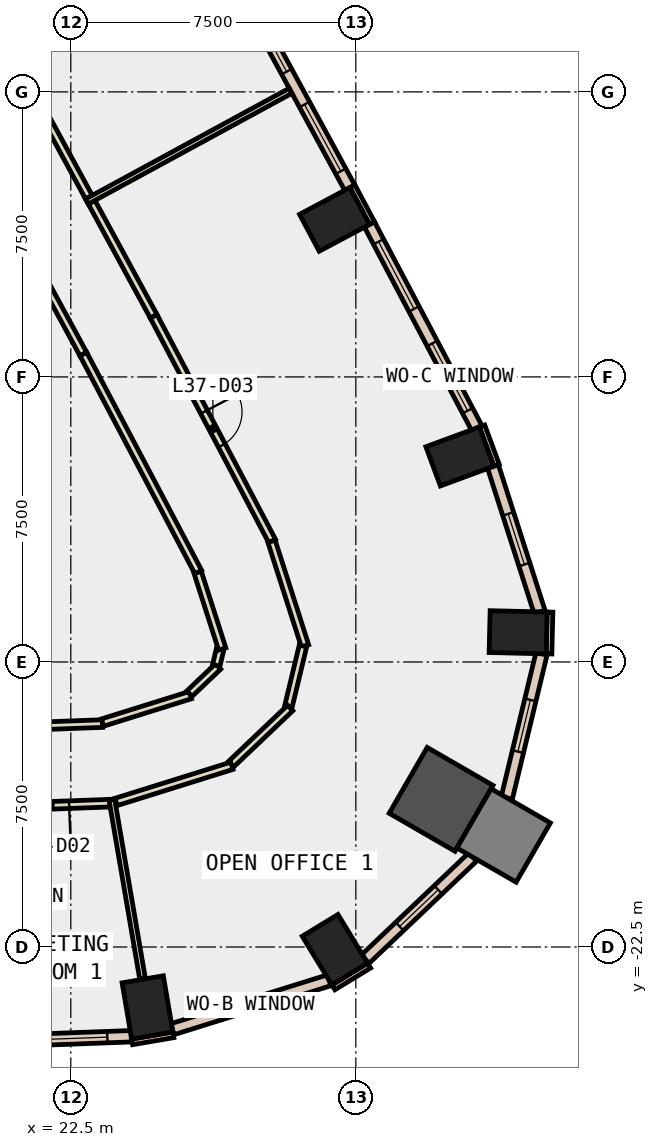
"""IFC4 building model, lengths in metres.
Left out: names, types, materials, properties, quantities, classifications, styles, units other than length and angle.
Written with IfcOpenShell. Run it as: python <this file> out.ifc"""

import sys

from ifc_helpers import new_model, si_unit, direction, frame, frame_2d, origin, origin_2d, place, context, subcontext, project, spatial, rectangle, extrude, element, fill, save


model = new_model("IFC4")
c1 = context("Model", 3, precision=1e-05, world=origin(), true_north=direction((0.0, 1.0)))
c2 = subcontext(c1, "Body", "Model", "MODEL_VIEW")
j1 = project(units=[si_unit("LENGTHUNIT", "METRE"), si_unit("PLANEANGLEUNIT", "RADIAN")], contexts=[c1])
p1 = place(None, origin())
s1 = spatial("IfcSite", under=j1, at=p1, CompositionType="ELEMENT")
p2 = place(p1, origin())
s2 = spatial("IfcBuilding", under=s1, at=p2, CompositionType="ELEMENT")
p3 = place(p2, frame((0.0, 0.0, 167.6)))
s3 = spatial("IfcBuildingStorey", under=s2, at=p3, CompositionType="ELEMENT", Elevation=167.6)
for number, where, z_axis, x_axis in (
    (1, (24.518, -24.09, -0.4), (0.0, 0.0, 1.0), (0.986, 0.168, 0.0)),
    (2, (29.45, -22.571, -0.4), (0.0, 0.0, 1.0), (0.854, 0.521, 0.0)),
):
    element("IfcColumn", number, at=place(p3, frame(where, z_axis=z_axis, x_axis=x_axis)), inside=s3, PredefinedType="COLUMN", context=c2, shape_type="SweptSolid", body=[
        extrude(rectangle(XDim=1.1, YDim=1.5, at=origin_2d()), origin(), (0.0, 0.0, 1.0), 4.2),
    ])
p4 = place(p3, frame((32.244, -18.615, -0.4), z_axis=(0.0, 0.0, 1.0), x_axis=(-0.866025403784, 0.5, 0.0)))
e3 = element("IfcColumn", 3, at=p4, inside=s3, PredefinedType="COLUMN", context=c2, shape_type="SweptSolid", body=[
    extrude(rectangle(XDim=2.0, YDim=2.0, at=origin_2d()), origin(), (0.0, 0.0, 1.0), 4.2),
])
for number, where, z_axis, x_axis in (
    (4, (34.271, -14.219, -0.4), (0.0, 0.0, 1.0), (0.024, 1.0, 0.0)),
    (5, (32.738, -9.593, -0.4), (0.0, 0.0, 1.0), (-0.347, 0.938, 0.0)),
    (6, (29.44, -3.355, -0.4), (0.0, 0.0, 1.0), (-0.47, 0.883, 0.0)),
):
    element("IfcColumn", number, at=place(p3, frame(where, z_axis=z_axis, x_axis=x_axis)), inside=s3, PredefinedType="COLUMN", context=c2, shape_type="SweptSolid", body=[
        extrude(rectangle(XDim=1.1, YDim=1.5, at=origin_2d()), origin(), (0.0, 0.0, 1.0), 4.2),
    ])
p5 = place(p3, frame((33.889, -19.565, -0.4), z_axis=(0.0, 0.0, 1.0), x_axis=(-0.866025403784, 0.5, 0.0)))
e7 = element("IfcColumn", 7, at=p5, inside=s3, PredefinedType="COLUMN", context=c2, shape_type="SweptSolid", body=[
    extrude(rectangle(XDim=1.8, YDim=1.8, at=origin_2d()), origin(), (0.0, 0.0, 1.0), 4.2),
])
for number, where, z_axis, x_axis in (
    (8, (33.702, -9.823, 0.0), (0.0, 0.0, 1.0), (-0.346, 0.938, 0.0)),
    (9, (30.426, -3.453, 0.0), (0.0, 0.0, 1.0), (-0.47, 0.883, 0.0)),
):
    element("IfcWall", number, at=place(p3, frame(where, z_axis=z_axis, x_axis=x_axis)), inside=s3, PredefinedType="STANDARD", context=c2, shape_type="SweptSolid", body=[
        extrude(rectangle(XDim=1.1, YDim=0.15, at=frame_2d((0.55, 0.0))), origin(), (0.0, 0.0, 1.0), 3.8),
    ])
p6 = place(p3, frame((24.114, -24.996, 0.0), z_axis=(0.0, 0.0, 1.0), x_axis=(0.985763338892, 0.168138751323, 0.0)))
e10 = element("IfcWall", 10, at=p6, inside=s3, PredefinedType="STANDARD", context=c2, shape_type="SweptSolid", body=[
    extrude(rectangle(XDim=1.101, YDim=0.15, at=frame_2d((0.55, 0.0))), origin(), (0.0, 0.0, 1.0), 3.8),
])
p7 = place(p3, frame((29.41, -23.561, 0.0), z_axis=(0.0, 0.0, 1.0), x_axis=(0.854065628997, 0.520165263514, 0.0)))
e11 = element("IfcWall", 11, at=p7, inside=s3, PredefinedType="STANDARD", context=c2, shape_type="SweptSolid", body=[
    extrude(rectangle(XDim=1.1, YDim=0.15, at=frame_2d((0.55, 0.0))), origin(), (0.0, 0.0, 1.0), 3.8),
])
p8 = place(p3, frame((35.083, -14.789, 0.0), z_axis=(0.0, 0.0, 1.0), x_axis=(0.023517683673, 0.999723421029, 0.0)))
e12 = element("IfcWall", 12, at=p8, inside=s3, PredefinedType="STANDARD", context=c2, shape_type="SweptSolid", body=[
    extrude(rectangle(XDim=1.1, YDim=0.15, at=frame_2d((0.55, 0.0))), origin(), (0.0, 0.0, 1.0), 3.8),
])
p9 = place(p3, frame((16.778, -25.12, 0.0), z_axis=(0.0, 0.0, 1.0), x_axis=(0.999307730926, 0.037202942236, 0.0)))
e13 = element("IfcWall", 13, at=p9, inside=s3, PredefinedType="STANDARD", context=c2, shape_type="SweptSolid", body=[
    extrude(rectangle(XDim=7.317, YDim=0.3, at=frame_2d((3.659, 0.0))), origin(), (0.0, 0.0, 1.0), 3.8),
])
p10 = place(p9, frame((0.629, 0.0, 0.9)))
e14 = element("IfcOpeningElement", 14, at=p10, cuts=e13, PredefinedType="OPENING", context=c2, shape_type="SweptSolid", body=[
    extrude(rectangle(XDim=2.4, YDim=2.6, at=frame_2d((1.2, 1.3))), frame((0.0, 0.16, 0.0), z_axis=(0.0, -1.0, 0.0), x_axis=(1.0, 0.0, 0.0)), (0.0, 0.0, 1.0), 0.32),
])
p11 = place(p9, frame((4.288, 0.0, 0.9)))
e15 = element("IfcOpeningElement", 15, at=p11, cuts=e13, PredefinedType="OPENING", context=c2, shape_type="SweptSolid", body=[
    extrude(rectangle(XDim=2.4, YDim=2.6, at=frame_2d((1.2, 1.3))), frame((0.0, 0.16, 0.0), z_axis=(0.0, -1.0, 0.0), x_axis=(1.0, 0.0, 0.0)), (0.0, 0.0, 1.0), 0.32),
])
p12 = place(p3, frame((25.172, -24.663, 0.0), z_axis=(0.0, 0.0, 1.0), x_axis=(0.954628614874, 0.29779893832, 0.0)))
e16 = element("IfcWall", 16, at=p12, inside=s3, PredefinedType="STANDARD", context=c2, shape_type="SweptSolid", body=[
    extrude(rectangle(XDim=4.322, YDim=0.3, at=frame_2d((2.161, 0.0))), origin(), (0.0, 0.0, 1.0), 3.8),
])
p13 = place(p12, frame((1.461, 0.0, 0.9)))
e17 = element("IfcOpeningElement", 17, at=p13, cuts=e16, PredefinedType="OPENING", context=c2, shape_type="SweptSolid", body=[
    extrude(rectangle(XDim=1.4, YDim=2.6, at=frame_2d((0.7, 1.3))), frame((0.0, 0.16, 0.0), z_axis=(0.0, -1.0, 0.0), x_axis=(1.0, 0.0, 0.0)), (0.0, 0.0, 1.0), 0.32),
])
p14 = place(p3, frame((30.246, -22.821, 0.0), z_axis=(0.0, 0.0, 1.0), x_axis=(0.724807239831, 0.688951714628, 0.0)))
e18 = element("IfcWall", 18, at=p14, inside=s3, PredefinedType="STANDARD", context=c2, shape_type="SweptSolid", body=[
    extrude(rectangle(XDim=3.902, YDim=0.3, at=frame_2d((1.951, 0.0))), origin(), (0.0, 0.0, 1.0), 3.8),
])
p15 = place(p14, frame((1.251, 0.0, 0.9)))
e19 = element("IfcOpeningElement", 19, at=p15, cuts=e18, PredefinedType="OPENING", context=c2, shape_type="SweptSolid", body=[
    extrude(rectangle(XDim=1.4, YDim=2.6, at=frame_2d((0.7, 1.3))), frame((0.0, 0.16, 0.0), z_axis=(0.0, -1.0, 0.0), x_axis=(1.0, 0.0, 0.0)), (0.0, 0.0, 1.0), 0.32),
])
p16 = place(p3, frame((33.973, -18.575, 0.0), z_axis=(0.0, 0.0, 1.0), x_axis=(0.234102046927, 0.972212030179, 0.0)))
e20 = element("IfcWall", 20, at=p16, inside=s3, PredefinedType="STANDARD", context=c2, shape_type="SweptSolid", body=[
    extrude(rectangle(XDim=3.9, YDim=0.3, at=frame_2d((1.95, 0.0))), origin(), (0.0, 0.0, 1.0), 3.8),
])
p17 = place(p16, frame((1.25, 0.0, 0.9)))
e21 = element("IfcOpeningElement", 21, at=p17, cuts=e20, PredefinedType="OPENING", context=c2, shape_type="SweptSolid", body=[
    extrude(rectangle(XDim=1.4, YDim=2.6, at=frame_2d((0.7, 1.3))), frame((0.0, 0.16, 0.0), z_axis=(0.0, -1.0, 0.0), x_axis=(1.0, 0.0, 0.0)), (0.0, 0.0, 1.0), 0.32),
])
p18 = place(p3, frame((34.835, -13.684, 0.0), z_axis=(0.0, 0.0, 1.0), x_axis=(-0.305018133869, 0.952346543025, 0.0)))
e22 = element("IfcWall", 22, at=p18, inside=s3, PredefinedType="STANDARD", context=c2, shape_type="SweptSolid", body=[
    extrude(rectangle(XDim=4.02, YDim=0.3, at=frame_2d((2.01, 0.0))), origin(), (0.0, 0.0, 1.0), 3.8),
])
p19 = place(p18, frame((1.31, 0.0, 0.9)))
e23 = element("IfcOpeningElement", 23, at=p19, cuts=e22, PredefinedType="OPENING", context=c2, shape_type="SweptSolid", body=[
    extrude(rectangle(XDim=1.4, YDim=2.6, at=frame_2d((0.7, 1.3))), frame((0.0, 0.16, 0.0), z_axis=(0.0, -1.0, 0.0), x_axis=(1.0, 0.0, 0.0)), (0.0, 0.0, 1.0), 0.32),
])
p20 = place(p3, frame((33.182, -8.844, 0.0), z_axis=(0.0, 0.0, 1.0), x_axis=(-0.466399410196, 0.884574242316, 0.0)))
e24 = element("IfcWall", 24, at=p20, inside=s3, PredefinedType="STANDARD", context=c2, shape_type="SweptSolid", body=[
    extrude(rectangle(XDim=6.055, YDim=0.3, at=frame_2d((3.027, 0.0))), origin(), (0.0, 0.0, 1.0), 3.8),
])
p21 = place(p20, frame((0.514, 0.0, 0.9)))
e25 = element("IfcOpeningElement", 25, at=p21, cuts=e24, PredefinedType="OPENING", context=c2, shape_type="SweptSolid", body=[
    extrude(rectangle(XDim=2.0, YDim=2.6, at=frame_2d((1.0, 1.3))), frame((0.0, 0.16, 0.0), z_axis=(0.0, -1.0, 0.0), x_axis=(1.0, 0.0, 0.0)), (0.0, 0.0, 1.0), 0.32),
])
p22 = place(p20, frame((3.541, 0.0, 0.9)))
e26 = element("IfcOpeningElement", 26, at=p22, cuts=e24, PredefinedType="OPENING", context=c2, shape_type="SweptSolid", body=[
    extrude(rectangle(XDim=2.0, YDim=2.6, at=frame_2d((1.0, 1.3))), frame((0.0, 0.16, 0.0), z_axis=(0.0, -1.0, 0.0), x_axis=(1.0, 0.0, 0.0)), (0.0, 0.0, 1.0), 0.32),
])
p23 = place(p3, frame((29.839, -2.52, 0.0), z_axis=(0.0, 0.0, 1.0), x_axis=(-0.477555226268, 0.878601733361, 0.0)))
e27 = element("IfcWall", 27, at=p23, inside=s3, PredefinedType="STANDARD", context=c2, shape_type="SweptSolid", body=[
    extrude(rectangle(XDim=5.964, YDim=0.3, at=frame_2d((2.982, 0.0))), origin(), (0.0, 0.0, 1.0), 3.8),
])
p24 = place(p23, frame((0.491, 0.0, 0.9)))
e28 = element("IfcOpeningElement", 28, at=p24, cuts=e27, PredefinedType="OPENING", context=c2, shape_type="SweptSolid", body=[
    extrude(rectangle(XDim=2.0, YDim=2.6, at=frame_2d((1.0, 1.3))), frame((0.0, 0.16, 0.0), z_axis=(0.0, -1.0, 0.0), x_axis=(1.0, 0.0, 0.0)), (0.0, 0.0, 1.0), 0.32),
])
p25 = place(p23, frame((3.473, 0.0, 0.9)))
e29 = element("IfcOpeningElement", 29, at=p25, cuts=e27, PredefinedType="OPENING", context=c2, shape_type="SweptSolid", body=[
    extrude(rectangle(XDim=2.0, YDim=2.6, at=frame_2d((1.0, 1.3))), frame((0.0, 0.16, 0.0), z_axis=(0.0, -1.0, 0.0), x_axis=(1.0, 0.0, 0.0)), (0.0, 0.0, 1.0), 0.32),
])
p26 = place(p3, frame((15.987, -16.893, 0.0), z_axis=(0.0, 0.0, 1.0), x_axis=(0.999316060953, 0.036978511606, 0.0)))
e30 = element("IfcWall", 30, at=p26, inside=s3, PredefinedType="PARTITIONING", context=c2, shape_type="SweptSolid", body=[
    extrude(rectangle(XDim=7.355, YDim=0.2, at=frame_2d((3.677, 0.0))), origin(), (0.0, 0.0, 1.0), 3.8),
])
p27 = place(p3, frame((23.333, -16.595, 0.0), z_axis=(0.0, 0.0, 1.0), x_axis=(0.95454810771, 0.298056890655, 0.0)))
e31 = element("IfcWall", 31, at=p27, inside=s3, PredefinedType="PARTITIONING", context=c2, shape_type="SweptSolid", body=[
    extrude(rectangle(XDim=2.422, YDim=0.2, at=frame_2d((1.211, 0.0))), origin(), (0.0, 0.0, 1.0), 3.8),
])
p28 = place(p3, frame((25.622, -15.834, 0.0), z_axis=(0.0, 0.0, 1.0), x_axis=(0.725069777966, 0.688675407634, 0.0)))
e32 = element("IfcWall", 32, at=p28, inside=s3, PredefinedType="PARTITIONING", context=c2, shape_type="SweptSolid", body=[
    extrude(rectangle(XDim=1.04, YDim=0.2, at=frame_2d((0.52, 0.0))), origin(), (0.0, 0.0, 1.0), 3.8),
])
p29 = place(p3, frame((26.327, -15.089, 0.0), z_axis=(0.0, 0.0, 1.0), x_axis=(0.233414791565, 0.972377259647, 0.0)))
e33 = element("IfcWall", 33, at=p29, inside=s3, PredefinedType="PARTITIONING", context=c2, shape_type="SweptSolid", body=[
    extrude(rectangle(XDim=0.441, YDim=0.2, at=frame_2d((0.221, 0.0))), origin(), (0.0, 0.0, 1.0), 3.8),
])
p30 = place(p3, frame((26.484, -14.658, 0.0), z_axis=(0.0, 0.0, 1.0), x_axis=(-0.305169069368, 0.952298188122, 0.0)))
e34 = element("IfcWall", 34, at=p30, inside=s3, PredefinedType="PARTITIONING", context=c2, shape_type="SweptSolid", body=[
    extrude(rectangle(XDim=2.117, YDim=0.2, at=frame_2d((1.059, 0.0))), origin(), (0.0, 0.0, 1.0), 3.8),
])
p31 = place(p3, frame((25.854, -12.635, 0.0), z_axis=(0.0, 0.0, 1.0), x_axis=(-0.466483047656, 0.884530138689, 0.0)))
e35 = element("IfcWall", 35, at=p31, inside=s3, PredefinedType="PARTITIONING", context=c2, shape_type="SweptSolid", body=[
    extrude(rectangle(XDim=6.487, YDim=0.2, at=frame_2d((3.244, 0.0))), origin(), (0.0, 0.0, 1.0), 3.8),
])
p32 = place(p3, frame((22.828, -6.897, 0.0), z_axis=(0.0, 0.0, 1.0), x_axis=(-0.477513909405, 0.878624189472, 0.0)))
e36 = element("IfcWall", 36, at=p32, inside=s3, PredefinedType="PARTITIONING", context=c2, shape_type="SweptSolid", body=[
    extrude(rectangle(XDim=6.956, YDim=0.2, at=frame_2d((3.478, 0.0))), origin(), (0.0, 0.0, 1.0), 3.8),
])
p33 = place(p3, frame((23.62, -18.712, 0.0), z_axis=(0.0, 0.0, 1.0), x_axis=(-0.999316841287, -0.03695741767, 0.0)))
e37 = element("IfcWall", 37, at=p33, inside=s3, PredefinedType="PARTITIONING", context=c2, shape_type="SweptSolid", body=[
    extrude(rectangle(XDim=3.329, YDim=0.2, at=frame_2d((1.665, 0.0))), origin(), (0.0, 0.0, 1.0), 3.8),
])
p34 = place(p33, frame((1.165, 0.0, 0.0)))
e38 = element("IfcOpeningElement", 38, at=p34, cuts=e37, PredefinedType="OPENING", context=c2, shape_type="SweptSolid", body=[
    extrude(rectangle(XDim=1.0, YDim=2.1, at=frame_2d((0.5, 1.05))), frame((0.0, 0.11, 0.0), z_axis=(0.0, -1.0, 0.0), x_axis=(1.0, 0.0, 0.0)), (0.0, 0.0, 1.0), 0.22),
])
p35 = place(p3, frame((23.048, -2.903, 0.0), z_axis=(0.0, 0.0, 1.0), x_axis=(0.477470161865, -0.878647963936, 0.0)))
e39 = element("IfcWall", 39, at=p35, inside=s3, PredefinedType="PARTITIONING", context=c2, shape_type="SweptSolid", body=[
    extrude(rectangle(XDim=3.418, YDim=0.2, at=frame_2d((1.709, 0.0))), origin(), (0.0, 0.0, 1.0), 3.8),
])
p36 = place(p3, frame((24.68, -5.906, 0.0), z_axis=(0.0, 0.0, 1.0), x_axis=(0.466450727507, -0.884547182918, 0.0)))
e40 = element("IfcWall", 40, at=p36, inside=s3, PredefinedType="PARTITIONING", context=c2, shape_type="SweptSolid", body=[
    extrude(rectangle(XDim=6.685, YDim=0.2, at=frame_2d((3.342, 0.0))), origin(), (0.0, 0.0, 1.0), 3.8),
])
p37 = place(p36, frame((2.842, 0.0, 0.0)))
e41 = element("IfcOpeningElement", 41, at=p37, cuts=e40, PredefinedType="OPENING", context=c2, shape_type="SweptSolid", body=[
    extrude(rectangle(XDim=1.0, YDim=2.1, at=frame_2d((0.5, 1.05))), frame((0.0, 0.11, 0.0), z_axis=(0.0, -1.0, 0.0), x_axis=(1.0, 0.0, 0.0)), (0.0, 0.0, 1.0), 0.22),
])
p38 = place(p3, frame((27.782, -11.825, 0.0), z_axis=(0.0, 0.0, 1.0), x_axis=(0.304925942137, -0.952376065329, 0.0)))
e42 = element("IfcWall", 42, at=p38, inside=s3, PredefinedType="PARTITIONING", context=c2, shape_type="SweptSolid", body=[
    extrude(rectangle(XDim=2.89, YDim=0.2, at=frame_2d((1.445, 0.0))), origin(), (0.0, 0.0, 1.0), 3.8),
])
p39 = place(p3, frame((28.609, -14.579, 0.0), z_axis=(0.0, 0.0, 1.0), x_axis=(-0.233826017197, -0.972278454807, 0.0)))
e43 = element("IfcWall", 43, at=p39, inside=s3, PredefinedType="PARTITIONING", context=c2, shape_type="SweptSolid", body=[
    extrude(rectangle(XDim=1.651, YDim=0.2, at=frame_2d((0.825, 0.0))), origin(), (0.0, 0.0, 1.0), 3.8),
])
p40 = place(p3, frame((28.272, -16.212, 0.0), z_axis=(0.0, 0.0, 1.0), x_axis=(-0.724712974479, -0.689050872303, 0.0)))
e44 = element("IfcWall", 44, at=p40, inside=s3, PredefinedType="PARTITIONING", context=c2, shape_type="SweptSolid", body=[
    extrude(rectangle(XDim=2.15, YDim=0.2, at=frame_2d((1.075, 0.0))), origin(), (0.0, 0.0, 1.0), 3.8),
])
p41 = place(p3, frame((26.737, -17.732, 0.0), z_axis=(0.0, 0.0, 1.0), x_axis=(-0.954546657381, -0.298061535398, 0.0)))
e45 = element("IfcWall", 45, at=p41, inside=s3, PredefinedType="PARTITIONING", context=c2, shape_type="SweptSolid", body=[
    extrude(rectangle(XDim=3.191, YDim=0.2, at=frame_2d((1.596, 0.0))), origin(), (0.0, 0.0, 1.0), 3.8),
])
p42 = place(p3, frame((21.345, 0.23, 0.0), z_axis=(0.0, 0.0, 1.0), x_axis=(0.477544508622, -0.878607558746, 0.0)))
e46 = element("IfcWall", 46, at=p42, inside=s3, PredefinedType="PARTITIONING", context=c2, shape_type="SweptSolid", body=[
    extrude(rectangle(XDim=3.416, YDim=0.2, at=frame_2d((1.708, 0.0))), origin(), (0.0, 0.0, 1.0), 3.8),
])
p43 = place(p3, frame((23.578, -18.614, 0.0), z_axis=(0.0, 0.0, 1.0), x_axis=(0.169054430835, -0.985606716401, 0.0)))
e47 = element("IfcWall", 47, at=p43, inside=s3, PredefinedType="PARTITIONING", context=c2, shape_type="SweptSolid", body=[
    extrude(rectangle(XDim=4.786, YDim=0.15, at=frame_2d((2.393, 0.0))), origin(), (0.0, 0.0, 1.0), 3.8),
])
p44 = place(p3, frame((22.924, -2.885, 0.0), z_axis=(0.0, 0.0, 1.0), x_axis=(0.878512782244, 0.477718841406, 0.0)))
e48 = element("IfcWall", 48, at=p44, inside=s3, PredefinedType="PARTITIONING", context=c2, shape_type="SweptSolid", body=[
    extrude(rectangle(XDim=6.1, YDim=0.15, at=frame_2d((3.05, 0.0))), origin(), (0.0, 0.0, 1.0), 3.8),
])
p45 = place(p11, origin())
e49 = element("IfcWindow", 49, at=p45, inside=s3, PartitioningType="SINGLE_PANEL", PredefinedType="WINDOW", context=c2, shape_type="SweptSolid", body=[
    extrude(rectangle(XDim=2.4, YDim=2.6, at=frame_2d((1.2, 1.3))), frame((0.0, 0.03, 0.0), z_axis=(0.0, -1.0, 0.0), x_axis=(1.0, 0.0, 0.0)), (0.0, 0.0, 1.0), 0.06),
])
fill(e15, e49)
p46 = place(p13, origin())
e50 = element("IfcWindow", 50, at=p46, inside=s3, PartitioningType="SINGLE_PANEL", PredefinedType="WINDOW", context=c2, shape_type="SweptSolid", body=[
    extrude(rectangle(XDim=1.4, YDim=2.6, at=frame_2d((0.7, 1.3))), frame((0.0, 0.03, 0.0), z_axis=(0.0, -1.0, 0.0), x_axis=(1.0, 0.0, 0.0)), (0.0, 0.0, 1.0), 0.06),
])
fill(e17, e50)
p47 = place(p15, origin())
e51 = element("IfcWindow", 51, at=p47, inside=s3, PartitioningType="SINGLE_PANEL", PredefinedType="WINDOW", context=c2, shape_type="SweptSolid", body=[
    extrude(rectangle(XDim=1.4, YDim=2.6, at=frame_2d((0.7, 1.3))), frame((0.0, 0.03, 0.0), z_axis=(0.0, -1.0, 0.0), x_axis=(1.0, 0.0, 0.0)), (0.0, 0.0, 1.0), 0.06),
])
fill(e19, e51)
p48 = place(p17, origin())
e52 = element("IfcWindow", 52, at=p48, inside=s3, PartitioningType="SINGLE_PANEL", PredefinedType="WINDOW", context=c2, shape_type="SweptSolid", body=[
    extrude(rectangle(XDim=1.4, YDim=2.6, at=frame_2d((0.7, 1.3))), frame((0.0, 0.03, 0.0), z_axis=(0.0, -1.0, 0.0), x_axis=(1.0, 0.0, 0.0)), (0.0, 0.0, 1.0), 0.06),
])
fill(e21, e52)
p49 = place(p19, origin())
e53 = element("IfcWindow", 53, at=p49, inside=s3, PartitioningType="SINGLE_PANEL", PredefinedType="WINDOW", context=c2, shape_type="SweptSolid", body=[
    extrude(rectangle(XDim=1.4, YDim=2.6, at=frame_2d((0.7, 1.3))), frame((0.0, 0.03, 0.0), z_axis=(0.0, -1.0, 0.0), x_axis=(1.0, 0.0, 0.0)), (0.0, 0.0, 1.0), 0.06),
])
fill(e23, e53)
p50 = place(p21, origin())
e54 = element("IfcWindow", 54, at=p50, inside=s3, PartitioningType="SINGLE_PANEL", PredefinedType="WINDOW", context=c2, shape_type="SweptSolid", body=[
    extrude(rectangle(XDim=2.0, YDim=2.6, at=frame_2d((1.0, 1.3))), frame((0.0, 0.03, 0.0), z_axis=(0.0, -1.0, 0.0), x_axis=(1.0, 0.0, 0.0)), (0.0, 0.0, 1.0), 0.06),
])
fill(e25, e54)
p51 = place(p22, origin())
e55 = element("IfcWindow", 55, at=p51, inside=s3, PartitioningType="SINGLE_PANEL", PredefinedType="WINDOW", context=c2, shape_type="SweptSolid", body=[
    extrude(rectangle(XDim=2.0, YDim=2.6, at=frame_2d((1.0, 1.3))), frame((0.0, 0.03, 0.0), z_axis=(0.0, -1.0, 0.0), x_axis=(1.0, 0.0, 0.0)), (0.0, 0.0, 1.0), 0.06),
])
fill(e26, e55)
p52 = place(p24, origin())
e56 = element("IfcWindow", 56, at=p52, inside=s3, PartitioningType="SINGLE_PANEL", PredefinedType="WINDOW", context=c2, shape_type="SweptSolid", body=[
    extrude(rectangle(XDim=2.0, YDim=2.6, at=frame_2d((1.0, 1.3))), frame((0.0, 0.03, 0.0), z_axis=(0.0, -1.0, 0.0), x_axis=(1.0, 0.0, 0.0)), (0.0, 0.0, 1.0), 0.06),
])
fill(e28, e56)
p53 = place(p25, origin())
e57 = element("IfcWindow", 57, at=p53, inside=s3, PartitioningType="SINGLE_PANEL", PredefinedType="WINDOW", context=c2, shape_type="SweptSolid", body=[
    extrude(rectangle(XDim=2.0, YDim=2.6, at=frame_2d((1.0, 1.3))), frame((0.0, 0.03, 0.0), z_axis=(0.0, -1.0, 0.0), x_axis=(1.0, 0.0, 0.0)), (0.0, 0.0, 1.0), 0.06),
])
fill(e29, e57)
p54 = place(p34, origin())
e58 = element("IfcDoor", 58, at=p54, inside=s3, OperationType="SINGLE_SWING_LEFT", PredefinedType="DOOR", context=c2, shape_type="SweptSolid", body=[
    extrude(rectangle(XDim=1.0, YDim=2.1, at=frame_2d((0.5, 1.05))), frame((0.0, 0.025, 0.0), z_axis=(0.0, -1.0, 0.0), x_axis=(1.0, 0.0, 0.0)), (0.0, 0.0, 1.0), 0.05),
])
fill(e38, e58)
p55 = place(p37, origin())
e59 = element("IfcDoor", 59, at=p55, inside=s3, OperationType="SINGLE_SWING_LEFT", PredefinedType="DOOR", context=c2, shape_type="SweptSolid", body=[
    extrude(rectangle(XDim=1.0, YDim=2.1, at=frame_2d((0.5, 1.05))), frame((0.0, 0.025, 0.0), z_axis=(0.0, -1.0, 0.0), x_axis=(1.0, 0.0, 0.0)), (0.0, 0.0, 1.0), 0.05),
])
fill(e41, e59)
save(model, sys.argv[1])
